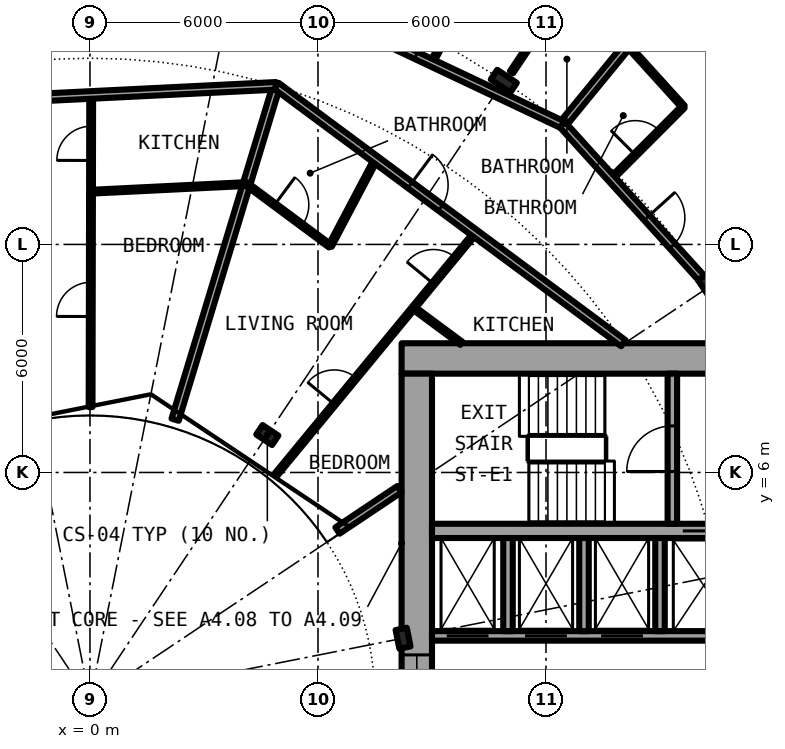
"""IFC4 building model, lengths in metres.
Left out: names, types, materials, properties, quantities, classifications, styles, units other than length and angle.
Written with IfcOpenShell. Run it as: python <this file> out.ifc"""

import sys

from ifc_helpers import new_model, si_unit, direction, frame, frame_2d, origin, origin_2d, place, context, subcontext, project, spatial, rectangle, i_section, extrude, element, fill, save


model = new_model("IFC4")
c1 = context("Model", 3, precision=1e-05, world=origin(), true_north=direction((0.0, 1.0)))
c2 = subcontext(c1, "Body", "Model", "MODEL_VIEW")
j1 = project(units=[si_unit("LENGTHUNIT", "METRE"), si_unit("PLANEANGLEUNIT", "RADIAN")], contexts=[c1])
p1 = place(None, origin())
s1 = spatial("IfcSite", under=j1, at=p1, CompositionType="ELEMENT")
p2 = place(p1, origin())
s2 = spatial("IfcBuilding", under=s1, at=p2, CompositionType="ELEMENT")
p3 = place(p2, frame((0.0, 0.0, 41.1)))
s3 = spatial("IfcBuildingStorey", under=s2, at=p3, CompositionType="ELEMENT", Elevation=41.1)
for number, where, z_axis, x_axis in (
    (1, (16.297, 10.889, 0.0), (0.0, 0.0, 1.0), (0.831, 0.556, 0.0)),
    (2, (10.889, 16.297, 0.0), (0.0, 0.0, 1.0), (0.556, 0.831, 0.0)),
):
    element("IfcColumn", number, at=place(p3, frame(where, z_axis=z_axis, x_axis=x_axis)), inside=s3, PredefinedType="COLUMN", context=c2, shape_type="SweptSolid", body=[
        extrude(i_section(OverallWidth=0.305, OverallDepth=0.62, WebThickness=0.021, FlangeThickness=0.04, FilletRadius=0.027, at=origin_2d()), origin(), (0.0, 0.0, 1.0), 3.05),
    ])
for number, where, z_axis, x_axis in (
    (3, (8.239, 1.639, 0.0), (0.0, 0.0, 1.0), (0.981, 0.195, 0.0)),
    (4, (4.667, 6.984, 0.0), (0.0, 0.0, 1.0), (0.556, 0.831, 0.0)),
):
    element("IfcColumn", number, at=place(p3, frame(where, z_axis=z_axis, x_axis=x_axis)), inside=s3, PredefinedType="COLUMN", context=c2, shape_type="SweptSolid", body=[
        extrude(i_section(OverallWidth=0.3, OverallDepth=0.5, WebThickness=0.014, FlangeThickness=0.028, FilletRadius=0.027, at=origin_2d()), origin(), (0.0, 0.0, 1.0), 3.05),
    ])
p4 = place(p3, frame((22.4, 9.0, 0.0), z_axis=(0.0, 0.0, 1.0), x_axis=(-1.0, 0.0, 0.0)))
e5 = element("IfcWall", 5, at=p4, inside=s3, PredefinedType="SHEAR", context=c2, shape_type="SweptSolid", body=[
    extrude(rectangle(XDim=14.2, YDim=0.8, at=frame_2d((7.1, 0.0))), origin(), (0.0, 0.0, 1.0), 3.05),
])
p5 = place(p4, frame((1.325, 0.0, 0.0)))
e6 = element("IfcOpeningElement", 6, at=p5, cuts=e5, PredefinedType="OPENING", context=c2, shape_type="SweptSolid", body=[
    extrude(rectangle(XDim=1.2, YDim=2.3, at=frame_2d((0.6, 1.15))), frame((0.0, 0.41, 0.0), z_axis=(0.0, -1.0, 0.0), x_axis=(1.0, 0.0, 0.0)), (0.0, 0.0, 1.0), 0.82),
])
p6 = place(p3, frame((8.6, -8.6, 0.0), z_axis=(0.0, 0.0, 1.0), x_axis=(0.0, 1.0, 0.0)))
e7 = element("IfcWall", 7, at=p6, inside=s3, PredefinedType="SHEAR", context=c2, shape_type="SweptSolid", body=[
    extrude(rectangle(XDim=17.2, YDim=0.8, at=frame_2d((8.6, 0.0))), origin(), (0.0, 0.0, 1.0), 3.05),
])
p7 = place(p6, frame((7.4, 0.0, 0.1)))
e8 = element("IfcOpeningElement", 8, at=p7, cuts=e7, PredefinedType="OPENING", context=c2, shape_type="SweptSolid", body=[
    extrude(rectangle(XDim=2.4, YDim=2.2, at=frame_2d((1.2, 1.1))), frame((0.0, 0.41, 0.0), z_axis=(0.0, -1.0, 0.0), x_axis=(1.0, 0.0, 0.0)), (0.0, 0.0, 1.0), 0.82),
])
p8 = place(p3, frame((9.0, 1.7, 0.0), z_axis=(0.0, 0.0, 1.0), x_axis=(1.0, 0.0, 0.0)))
e9 = element("IfcWall", 9, at=p8, inside=s3, PredefinedType="SHEAR", context=c2, shape_type="SweptSolid", body=[
    extrude(rectangle(XDim=10.15, YDim=0.25, at=frame_2d((5.075, 0.0))), origin(), (0.0, 0.0, 1.0), 3.05),
])
p9 = place(p8, frame((0.387, 0.0, 0.0)))
e10 = element("IfcOpeningElement", 10, at=p9, cuts=e9, PredefinedType="OPENING", context=c2, shape_type="SweptSolid", body=[
    extrude(rectangle(XDim=1.1, YDim=2.3, at=frame_2d((0.55, 1.15))), frame((0.0, 0.135, 0.0), z_axis=(0.0, -1.0, 0.0), x_axis=(1.0, 0.0, 0.0)), (0.0, 0.0, 1.0), 0.27),
])
p10 = place(p8, frame((2.45, 0.0, 0.0)))
e11 = element("IfcOpeningElement", 11, at=p10, cuts=e9, PredefinedType="OPENING", context=c2, shape_type="SweptSolid", body=[
    extrude(rectangle(XDim=1.1, YDim=2.3, at=frame_2d((0.55, 1.15))), frame((0.0, 0.135, 0.0), z_axis=(0.0, -1.0, 0.0), x_axis=(1.0, 0.0, 0.0)), (0.0, 0.0, 1.0), 0.27),
])
p11 = place(p8, frame((4.45, 0.0, 0.0)))
e12 = element("IfcOpeningElement", 12, at=p11, cuts=e9, PredefinedType="OPENING", context=c2, shape_type="SweptSolid", body=[
    extrude(rectangle(XDim=1.1, YDim=2.3, at=frame_2d((0.55, 1.15))), frame((0.0, 0.135, 0.0), z_axis=(0.0, -1.0, 0.0), x_axis=(1.0, 0.0, 0.0)), (0.0, 0.0, 1.0), 0.27),
])
p12 = place(p3, frame((9.0, 4.462, 0.0), z_axis=(0.0, 0.0, 1.0), x_axis=(1.0, 0.0, 0.0)))
e13 = element("IfcWall", 13, at=p12, inside=s3, PredefinedType="SHEAR", context=c2, shape_type="SweptSolid", body=[
    extrude(rectangle(XDim=10.15, YDim=0.375, at=frame_2d((5.075, 0.0))), origin(), (0.0, 0.0, 1.0), 3.05),
])
p13 = place(p12, frame((6.6, 0.0, 0.0)))
e14 = element("IfcOpeningElement", 14, at=p13, cuts=e13, PredefinedType="OPENING", context=c2, shape_type="SweptSolid", body=[
    extrude(rectangle(XDim=1.1, YDim=2.3, at=frame_2d((0.55, 1.15))), frame((0.0, 0.198, 0.0), z_axis=(0.0, -1.0, 0.0), x_axis=(1.0, 0.0, 0.0)), (0.0, 0.0, 1.0), 0.395),
])
p14 = place(p3, frame((15.325, 4.65, 0.0), z_axis=(0.0, 0.0, 1.0), x_axis=(0.0, 1.0, 0.0)))
e15 = element("IfcWall", 15, at=p14, inside=s3, PredefinedType="SHEAR", context=c2, shape_type="SweptSolid", body=[
    extrude(rectangle(XDim=3.95, YDim=0.25, at=frame_2d((1.975, 0.0))), origin(), (0.0, 0.0, 1.0), 3.05),
])
p15 = place(p14, frame((1.375, 0.0, 0.0)))
e16 = element("IfcOpeningElement", 16, at=p15, cuts=e15, PredefinedType="OPENING", context=c2, shape_type="SweptSolid", body=[
    extrude(rectangle(XDim=1.2, YDim=2.3, at=frame_2d((0.6, 1.15))), frame((0.0, 0.135, 0.0), z_axis=(0.0, -1.0, 0.0), x_axis=(1.0, 0.0, 0.0)), (0.0, 0.0, 1.0), 0.27),
])
for number, where, z_axis, x_axis in (
    (17, (15.0, 1.825, 0.0), (0.0, 0.0, 1.0), (0.0, 1.0, 0.0)),
    (18, (11.0, 1.825, 0.0), (0.0, 0.0, 1.0), (0.0, 1.0, 0.0)),
    (19, (13.0, 1.825, 0.0), (0.0, 0.0, 1.0), (0.0, 1.0, 0.0)),
):
    element("IfcWall", number, at=place(p3, frame(where, z_axis=z_axis, x_axis=x_axis)), inside=s3, PredefinedType="SOLIDWALL", context=c2, shape_type="SweptSolid", body=[
        extrude(rectangle(XDim=2.45, YDim=0.25, at=frame_2d((1.225, 0.0))), origin(), (0.0, 0.0, 1.0), 2.7),
    ])
p16 = place(p3, frame((0.016, 7.72, 0.0), z_axis=(0.0, 0.0, 1.0), x_axis=(0.0019321625, 0.999998133372, 0.0)))
e20 = element("IfcWall", 20, at=p16, inside=s3, PredefinedType="PARTITIONING", context=c2, shape_type="SweptSolid", body=[
    extrude(rectangle(XDim=8.213, YDim=0.1, at=frame_2d((4.106, 0.0))), origin(), (0.0, 0.0, 1.0), 2.7),
])
p17 = place(p16, frame((6.49, 0.0, 0.0)))
e21 = element("IfcOpeningElement", 21, at=p17, cuts=e20, PredefinedType="OPENING", context=c2, shape_type="SweptSolid", body=[
    extrude(rectangle(XDim=0.9, YDim=2.3, at=frame_2d((0.45, 1.15))), frame((0.0, 0.06, 0.0), z_axis=(0.0, -1.0, 0.0), x_axis=(1.0, 0.0, 0.0)), (0.0, 0.0, 1.0), 0.12),
])
p18 = place(p16, frame((2.384, 0.0, 0.0)))
e22 = element("IfcOpeningElement", 22, at=p18, cuts=e20, PredefinedType="OPENING", context=c2, shape_type="SweptSolid", body=[
    extrude(rectangle(XDim=0.9, YDim=2.3, at=frame_2d((0.45, 1.15))), frame((0.0, 0.06, 0.0), z_axis=(0.0, -1.0, 0.0), x_axis=(1.0, 0.0, 0.0)), (0.0, 0.0, 1.0), 0.12),
])
p19 = place(p3, frame((2.241, 7.388, 0.0), z_axis=(0.0, 0.0, 1.0), x_axis=(0.290323311932, 0.956928615179, 0.0)))
e23 = element("IfcWall", 23, at=p19, inside=s3, PredefinedType="PARTITIONING", context=c2, shape_type="SweptSolid", body=[
    extrude(rectangle(XDim=9.179, YDim=0.2, at=frame_2d((4.59, 0.0))), origin(), (0.0, 0.0, 1.0), 2.7),
])
p20 = place(p3, frame((4.909, 5.958, 0.0), z_axis=(0.0, 0.0, 1.0), x_axis=(0.635976043025, 0.771708800454, 0.0)))
e24 = element("IfcWall", 24, at=p20, inside=s3, PredefinedType="PARTITIONING", context=c2, shape_type="SweptSolid", body=[
    extrude(rectangle(XDim=8.213, YDim=0.1, at=frame_2d((4.106, 0.0))), origin(), (0.0, 0.0, 1.0), 2.7),
])
p21 = place(p20, frame((6.49, 0.0, 0.0)))
e25 = element("IfcOpeningElement", 25, at=p21, cuts=e24, PredefinedType="OPENING", context=c2, shape_type="SweptSolid", body=[
    extrude(rectangle(XDim=0.9, YDim=2.3, at=frame_2d((0.45, 1.15))), frame((0.0, 0.06, 0.0), z_axis=(0.0, -1.0, 0.0), x_axis=(1.0, 0.0, 0.0)), (0.0, 0.0, 1.0), 0.12),
])
p22 = place(p20, frame((2.384, 0.0, 0.0)))
e26 = element("IfcOpeningElement", 26, at=p22, cuts=e24, PredefinedType="OPENING", context=c2, shape_type="SweptSolid", body=[
    extrude(rectangle(XDim=0.9, YDim=2.3, at=frame_2d((0.45, 1.15))), frame((0.0, 0.06, 0.0), z_axis=(0.0, -1.0, 0.0), x_axis=(1.0, 0.0, 0.0)), (0.0, 0.0, 1.0), 0.12),
])
p23 = place(p3, frame((6.318, 11.96, 0.0), z_axis=(0.0, 0.0, 1.0), x_axis=(0.467001992543, 0.884256263173, 0.0)))
e27 = element("IfcWall", 27, at=p23, inside=s3, PredefinedType="PARTITIONING", context=c2, shape_type="SweptSolid", body=[
    extrude(rectangle(XDim=2.572, YDim=0.1, at=frame_2d((1.286, 0.0))), origin(), (0.0, 0.0, 1.0), 2.7),
])
p24 = place(p3, frame((8.99, 16.78, 0.0), z_axis=(0.0, 0.0, 1.0), x_axis=(0.472216244249, 0.881482738723, 0.0)))
e28 = element("IfcWall", 28, at=p24, inside=s3, PredefinedType="PARTITIONING", context=c2, shape_type="SweptSolid", body=[
    extrude(rectangle(XDim=2.622, YDim=0.1, at=frame_2d((1.311, 0.0))), origin(), (0.0, 0.0, 1.0), 2.7),
])
p25 = place(p24, frame((0.861, 0.0, 0.0)))
e29 = element("IfcOpeningElement", 29, at=p25, cuts=e28, PredefinedType="OPENING", context=c2, shape_type="SweptSolid", body=[
    extrude(rectangle(XDim=0.9, YDim=2.3, at=frame_2d((0.45, 1.15))), frame((0.0, 0.06, 0.0), z_axis=(0.0, -1.0, 0.0), x_axis=(1.0, 0.0, 0.0)), (0.0, 0.0, 1.0), 0.12),
])
p26 = place(p3, frame((11.093, 16.533, 0.0), z_axis=(0.0, 0.0, 1.0), x_axis=(0.557134474719, 0.830422288405, 0.0)))
e30 = element("IfcWall", 30, at=p26, inside=s3, PredefinedType="PARTITIONING", context=c2, shape_type="SweptSolid", body=[
    extrude(rectangle(XDim=1.965, YDim=0.1, at=frame_2d((0.983, 0.0))), origin(), (0.0, 0.0, 1.0), 2.7),
])
p27 = place(p3, frame((12.432, 15.152, 0.0), z_axis=(0.0, 0.0, 1.0), x_axis=(0.634353152115, 0.77304338714, 0.0)))
e31 = element("IfcWall", 31, at=p27, inside=s3, PredefinedType="PARTITIONING", context=c2, shape_type="SweptSolid", body=[
    extrude(rectangle(XDim=7.576, YDim=0.2, at=frame_2d((3.788, 0.0))), origin(), (0.0, 0.0, 1.0), 2.7),
])
p28 = place(p3, frame((13.722, 13.73, 0.0), z_axis=(0.0, 0.0, 1.0), x_axis=(0.706741540154, 0.707471833659, 0.0)))
e32 = element("IfcWall", 32, at=p28, inside=s3, PredefinedType="PARTITIONING", context=c2, shape_type="SweptSolid", body=[
    extrude(rectangle(XDim=2.674, YDim=0.1, at=frame_2d((1.337, 0.0))), origin(), (0.0, 0.0, 1.0), 2.7),
])
p29 = place(p28, frame((0.887, 0.0, 0.0)))
e33 = element("IfcOpeningElement", 33, at=p29, cuts=e32, PredefinedType="OPENING", context=c2, shape_type="SweptSolid", body=[
    extrude(rectangle(XDim=0.9, YDim=2.3, at=frame_2d((0.45, 1.15))), frame((0.0, 0.06, 0.0), z_axis=(0.0, -1.0, 0.0), x_axis=(1.0, 0.0, 0.0)), (0.0, 0.0, 1.0), 0.12),
])
p30 = place(p3, frame((6.513, 4.472, 0.0), z_axis=(0.0, 0.0, 1.0), x_axis=(0.831417956244, 0.555647533996, 0.0)))
e34 = element("IfcWall", 34, at=p30, inside=s3, PredefinedType="PARTITIONING", context=c2, shape_type="SweptSolid", body=[
    extrude(rectangle(XDim=1.962, YDim=0.2, at=frame_2d((0.981, 0.0))), origin(), (0.0, 0.0, 1.0), 2.7),
])
p31 = place(p3, frame((0.027, 13.387, 0.0), z_axis=(0.0, 0.0, 1.0), x_axis=(0.998783768304, 0.049305011635, 0.0)))
e35 = element("IfcWall", 35, at=p31, inside=s3, PredefinedType="PARTITIONING", context=c2, shape_type="SweptSolid", body=[
    extrude(rectangle(XDim=4.1, YDim=0.1, at=frame_2d((2.05, 0.0))), origin(), (0.0, 0.0, 1.0), 2.7),
])
p32 = place(p3, frame((4.122, 13.589, 0.0), z_axis=(0.0, 0.0, 1.0), x_axis=(0.803128348509, -0.595806055542, 0.0)))
e36 = element("IfcWall", 36, at=p32, inside=s3, PredefinedType="PARTITIONING", context=c2, shape_type="SweptSolid", body=[
    extrude(rectangle(XDim=2.734, YDim=0.1, at=frame_2d((1.367, 0.0))), origin(), (0.0, 0.0, 1.0), 2.7),
])
p33 = place(p32, frame((0.917, 0.0, 0.0)))
e37 = element("IfcOpeningElement", 37, at=p33, cuts=e36, PredefinedType="OPENING", context=c2, shape_type="SweptSolid", body=[
    extrude(rectangle(XDim=0.9, YDim=2.3, at=frame_2d((0.45, 1.15))), frame((0.0, 0.06, 0.0), z_axis=(0.0, -1.0, 0.0), x_axis=(1.0, 0.0, 0.0)), (0.0, 0.0, 1.0), 0.12),
])
p34 = place(p3, frame((8.515, 10.33, 0.0), z_axis=(0.0, 0.0, 1.0), x_axis=(0.803264156882, -0.595622946392, 0.0)))
e38 = element("IfcWall", 38, at=p34, inside=s3, PredefinedType="PARTITIONING", context=c2, shape_type="SweptSolid", body=[
    extrude(rectangle(XDim=1.565, YDim=0.1, at=frame_2d((0.782, 0.0))), origin(), (0.0, 0.0, 1.0), 2.7),
])
p35 = place(p3, frame((-6.472, 15.613, 0.0), z_axis=(0.0, 0.0, 1.0), x_axis=(0.998789903976, 0.049180562371, 0.0)))
e39 = element("IfcWall", 39, at=p35, inside=s3, PredefinedType="PARTITIONING", context=c2, shape_type="SweptSolid", body=[
    extrude(rectangle(XDim=11.388, YDim=0.2, at=frame_2d((5.694, 0.0))), origin(), (0.0, 0.0, 1.0), 2.7),
])
p36 = place(p35, frame((4.383, 0.0, 0.0)))
e40 = element("IfcOpeningElement", 40, at=p36, cuts=e39, PredefinedType="OPENING", context=c2, shape_type="SweptSolid", body=[
    extrude(rectangle(XDim=1.0, YDim=2.3, at=frame_2d((0.5, 1.15))), frame((0.0, 0.11, 0.0), z_axis=(0.0, -1.0, 0.0), x_axis=(1.0, 0.0, 0.0)), (0.0, 0.0, 1.0), 0.22),
])
p37 = place(p3, frame((4.906, 16.172, 0.0), z_axis=(0.0, 0.0, 1.0), x_axis=(0.803202106898, -0.595706618626, 0.0)))
e41 = element("IfcWall", 41, at=p37, inside=s3, PredefinedType="PARTITIONING", context=c2, shape_type="SweptSolid", body=[
    extrude(rectangle(XDim=11.368, YDim=0.2, at=frame_2d((5.684, 0.0))), origin(), (0.0, 0.0, 1.0), 2.7),
])
p38 = place(p37, frame((4.38, 0.0, 0.0)))
e42 = element("IfcOpeningElement", 42, at=p38, cuts=e41, PredefinedType="OPENING", context=c2, shape_type="SweptSolid", body=[
    extrude(rectangle(XDim=1.0, YDim=2.3, at=frame_2d((0.5, 1.15))), frame((0.0, 0.11, 0.0), z_axis=(0.0, -1.0, 0.0), x_axis=(1.0, 0.0, 0.0)), (0.0, 0.0, 1.0), 0.22),
])
p39 = place(p3, frame((3.966, 19.154, 0.0), z_axis=(0.0, 0.0, 1.0), x_axis=(0.904067688688, -0.427389300603, 0.0)))
e43 = element("IfcWall", 43, at=p39, inside=s3, PredefinedType="PARTITIONING", context=c2, shape_type="SweptSolid", body=[
    extrude(rectangle(XDim=9.366, YDim=0.2, at=frame_2d((4.683, 0.0))), origin(), (0.0, 0.0, 1.0), 2.38),
])
p40 = place(p39, frame((4.104, 0.0, 0.0)))
e44 = element("IfcOpeningElement", 44, at=p40, cuts=e43, PredefinedType="OPENING", context=c2, shape_type="SweptSolid", body=[
    extrude(rectangle(XDim=1.0, YDim=2.3, at=frame_2d((0.5, 1.15))), frame((0.0, 0.11, 0.0), z_axis=(0.0, -1.0, 0.0), x_axis=(1.0, 0.0, 0.0)), (0.0, 0.0, 1.0), 0.22),
])
p41 = place(p3, frame((12.434, 15.151, 0.0), z_axis=(0.0, 0.0, 1.0), x_axis=(0.671514934772, -0.740991020444, 0.0)))
e45 = element("IfcWall", 45, at=p41, inside=s3, PredefinedType="PARTITIONING", context=c2, shape_type="SweptSolid", body=[
    extrude(rectangle(XDim=5.598, YDim=0.2, at=frame_2d((2.799, 0.0))), origin(), (0.0, 0.0, 1.0), 2.38),
])
p42 = place(p41, frame((3.305, 0.0, 0.0)))
e46 = element("IfcOpeningElement", 46, at=p42, cuts=e45, PredefinedType="OPENING", context=c2, shape_type="SweptSolid", body=[
    extrude(rectangle(XDim=1.0, YDim=2.3, at=frame_2d((0.5, 1.15))), frame((0.0, 0.11, 0.0), z_axis=(0.0, -1.0, 0.0), x_axis=(1.0, 0.0, 0.0)), (0.0, 0.0, 1.0), 0.22),
])
p43 = place(p3, frame((14.147, 17.238, 0.0), z_axis=(0.0, 0.0, 1.0), x_axis=(0.671674967707, -0.740845960882, 0.0)))
e47 = element("IfcWall", 47, at=p43, inside=s3, PredefinedType="PARTITIONING", context=c2, shape_type="SweptSolid", body=[
    extrude(rectangle(XDim=2.181, YDim=0.1, at=frame_2d((1.091, 0.0))), origin(), (0.0, 0.0, 1.0), 2.7),
])
p44 = place(p9, origin())
e48 = element("IfcDoor", 48, at=p44, inside=s3, OperationType="DOUBLE_DOOR_SLIDING", PredefinedType="DOOR", context=c2, shape_type="SweptSolid", body=[
    extrude(rectangle(XDim=1.1, YDim=2.3, at=frame_2d((0.55, 1.15))), frame((0.0, 0.025, 0.0), z_axis=(0.0, -1.0, 0.0), x_axis=(1.0, 0.0, 0.0)), (0.0, 0.0, 1.0), 0.05),
])
fill(e10, e48)
p45 = place(p10, origin())
e49 = element("IfcDoor", 49, at=p45, inside=s3, OperationType="DOUBLE_DOOR_SLIDING", PredefinedType="DOOR", context=c2, shape_type="SweptSolid", body=[
    extrude(rectangle(XDim=1.1, YDim=2.3, at=frame_2d((0.55, 1.15))), frame((0.0, 0.025, 0.0), z_axis=(0.0, -1.0, 0.0), x_axis=(1.0, 0.0, 0.0)), (0.0, 0.0, 1.0), 0.05),
])
fill(e11, e49)
p46 = place(p11, origin())
e50 = element("IfcDoor", 50, at=p46, inside=s3, OperationType="DOUBLE_DOOR_SLIDING", PredefinedType="DOOR", context=c2, shape_type="SweptSolid", body=[
    extrude(rectangle(XDim=1.1, YDim=2.3, at=frame_2d((0.55, 1.15))), frame((0.0, 0.025, 0.0), z_axis=(0.0, -1.0, 0.0), x_axis=(1.0, 0.0, 0.0)), (0.0, 0.0, 1.0), 0.05),
])
fill(e12, e50)
p47 = place(p13, origin())
e51 = element("IfcDoor", 51, at=p47, inside=s3, OperationType="DOUBLE_DOOR_SLIDING", PredefinedType="DOOR", context=c2, shape_type="SweptSolid", body=[
    extrude(rectangle(XDim=1.1, YDim=2.3, at=frame_2d((0.55, 1.15))), frame((0.0, 0.025, 0.0), z_axis=(0.0, -1.0, 0.0), x_axis=(1.0, 0.0, 0.0)), (0.0, 0.0, 1.0), 0.05),
])
fill(e14, e51)
p48 = place(p15, origin())
e52 = element("IfcDoor", 52, at=p48, inside=s3, OperationType="SINGLE_SWING_LEFT", PredefinedType="DOOR", context=c2, shape_type="SweptSolid", body=[
    extrude(rectangle(XDim=1.2, YDim=2.3, at=frame_2d((0.6, 1.15))), frame((0.0, 0.025, 0.0), z_axis=(0.0, -1.0, 0.0), x_axis=(1.0, 0.0, 0.0)), (0.0, 0.0, 1.0), 0.05),
])
fill(e16, e52)
p49 = place(p7, origin())
e53 = element("IfcWindow", 53, at=p49, inside=s3, PartitioningType="SINGLE_PANEL", PredefinedType="WINDOW", context=c2, shape_type="SweptSolid", body=[
    extrude(rectangle(XDim=2.4, YDim=2.2, at=frame_2d((1.2, 1.1))), frame((0.0, 0.03, 0.0), z_axis=(0.0, -1.0, 0.0), x_axis=(1.0, 0.0, 0.0)), (0.0, 0.0, 1.0), 0.06),
])
fill(e8, e53)
p50 = place(p42, origin())
e54 = element("IfcDoor", 54, at=p50, inside=s3, OperationType="SINGLE_SWING_RIGHT", PredefinedType="DOOR", context=c2, shape_type="SweptSolid", body=[
    extrude(rectangle(XDim=1.0, YDim=2.3, at=frame_2d((0.5, 1.15))), frame((0.0, 0.025, 0.0), z_axis=(0.0, -1.0, 0.0), x_axis=(1.0, 0.0, 0.0)), (0.0, 0.0, 1.0), 0.05),
])
fill(e46, e54)
p51 = place(p29, origin())
e55 = element("IfcDoor", 55, at=p51, inside=s3, OperationType="SINGLE_SWING_RIGHT", PredefinedType="DOOR", context=c2, shape_type="SweptSolid", body=[
    extrude(rectangle(XDim=0.9, YDim=2.3, at=frame_2d((0.45, 1.15))), frame((0.0, 0.025, 0.0), z_axis=(0.0, -1.0, 0.0), x_axis=(1.0, 0.0, 0.0)), (0.0, 0.0, 1.0), 0.05),
])
fill(e33, e55)
p52 = place(p40, origin())
e56 = element("IfcDoor", 56, at=p52, inside=s3, OperationType="SINGLE_SWING_LEFT", PredefinedType="DOOR", context=c2, shape_type="SweptSolid", body=[
    extrude(rectangle(XDim=1.0, YDim=2.3, at=frame_2d((0.5, 1.15))), frame((0.0, 0.025, 0.0), z_axis=(0.0, -1.0, 0.0), x_axis=(1.0, 0.0, 0.0)), (0.0, 0.0, 1.0), 0.05),
])
fill(e44, e56)
p53 = place(p38, origin())
e57 = element("IfcDoor", 57, at=p53, inside=s3, OperationType="SINGLE_SWING_LEFT", PredefinedType="DOOR", context=c2, shape_type="SweptSolid", body=[
    extrude(rectangle(XDim=1.0, YDim=2.3, at=frame_2d((0.5, 1.15))), frame((0.0, 0.025, 0.0), z_axis=(0.0, -1.0, 0.0), x_axis=(1.0, 0.0, 0.0)), (0.0, 0.0, 1.0), 0.05),
])
fill(e42, e57)
p54 = place(p33, origin())
e58 = element("IfcDoor", 58, at=p54, inside=s3, OperationType="SINGLE_SWING_LEFT", PredefinedType="DOOR", context=c2, shape_type="SweptSolid", body=[
    extrude(rectangle(XDim=0.9, YDim=2.3, at=frame_2d((0.45, 1.15))), frame((0.0, 0.025, 0.0), z_axis=(0.0, -1.0, 0.0), x_axis=(1.0, 0.0, 0.0)), (0.0, 0.0, 1.0), 0.05),
])
fill(e37, e58)
p55 = place(p21, origin())
e59 = element("IfcDoor", 59, at=p55, inside=s3, OperationType="SINGLE_SWING_RIGHT", PredefinedType="DOOR", context=c2, shape_type="SweptSolid", body=[
    extrude(rectangle(XDim=0.9, YDim=2.3, at=frame_2d((0.45, 1.15))), frame((0.0, 0.025, 0.0), z_axis=(0.0, -1.0, 0.0), x_axis=(1.0, 0.0, 0.0)), (0.0, 0.0, 1.0), 0.05),
])
fill(e25, e59)
p56 = place(p22, origin())
e60 = element("IfcDoor", 60, at=p56, inside=s3, OperationType="SINGLE_SWING_LEFT", PredefinedType="DOOR", context=c2, shape_type="SweptSolid", body=[
    extrude(rectangle(XDim=0.9, YDim=2.3, at=frame_2d((0.45, 1.15))), frame((0.0, 0.025, 0.0), z_axis=(0.0, -1.0, 0.0), x_axis=(1.0, 0.0, 0.0)), (0.0, 0.0, 1.0), 0.05),
])
fill(e26, e60)
p57 = place(p17, origin())
e61 = element("IfcDoor", 61, at=p57, inside=s3, OperationType="SINGLE_SWING_RIGHT", PredefinedType="DOOR", context=c2, shape_type="SweptSolid", body=[
    extrude(rectangle(XDim=0.9, YDim=2.3, at=frame_2d((0.45, 1.15))), frame((0.0, 0.025, 0.0), z_axis=(0.0, -1.0, 0.0), x_axis=(1.0, 0.0, 0.0)), (0.0, 0.0, 1.0), 0.05),
])
fill(e21, e61)
p58 = place(p18, origin())
e62 = element("IfcDoor", 62, at=p58, inside=s3, OperationType="SINGLE_SWING_LEFT", PredefinedType="DOOR", context=c2, shape_type="SweptSolid", body=[
    extrude(rectangle(XDim=0.9, YDim=2.3, at=frame_2d((0.45, 1.15))), frame((0.0, 0.025, 0.0), z_axis=(0.0, -1.0, 0.0), x_axis=(1.0, 0.0, 0.0)), (0.0, 0.0, 1.0), 0.05),
])
fill(e22, e62)
save(model, sys.argv[1])
